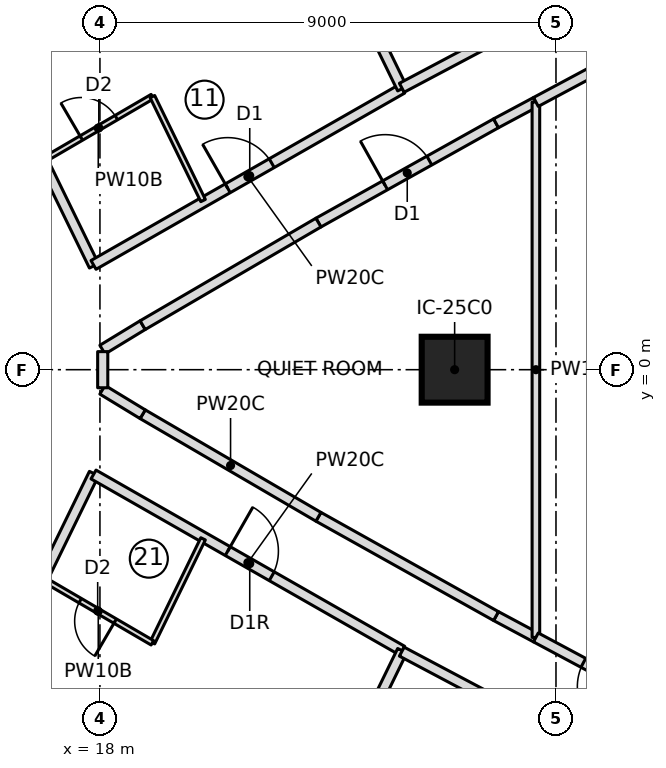
"""IFC4 building model, lengths in metres.
Left out: names, types, materials, properties, quantities, classifications, styles, units other than length and angle.
Written with IfcOpenShell. Run it as: python <this file> out.ifc"""

import sys

from ifc_helpers import new_model, si_unit, direction, frame, frame_2d, origin, origin_2d, place, context, subcontext, project, spatial, rectangle, extrude, element, fill, save


model = new_model("IFC4")
c1 = context("Model", 3, precision=1e-05, world=origin(), true_north=direction((0.0, 1.0)))
c2 = subcontext(c1, "Body", "Model", "MODEL_VIEW")
j1 = project(units=[si_unit("LENGTHUNIT", "METRE"), si_unit("PLANEANGLEUNIT", "RADIAN")], contexts=[c1])
p1 = place(None, origin())
s1 = spatial("IfcSite", under=j1, at=p1, CompositionType="ELEMENT")
p2 = place(p1, origin())
s2 = spatial("IfcBuilding", under=s1, at=p2, CompositionType="ELEMENT")
p3 = place(p2, frame((0.0, 0.0, 71.55)))
s3 = spatial("IfcBuildingStorey", under=s2, at=p3, CompositionType="ELEMENT", Elevation=71.55)
p4 = place(p3, frame((25.0, 0.0, 0.0), z_axis=(0.0, 0.0, 1.0), x_axis=(1.0, 0.0, 0.0)))
e1 = element("IfcColumn", 1, at=p4, inside=s3, PredefinedType="COLUMN", context=c2, shape_type="SweptSolid", body=[
    extrude(rectangle(XDim=1.3, YDim=1.3, at=origin_2d()), origin(), (0.0, 0.0, 1.0), 3.55),
])
p5 = place(p3, frame((17.882, 2.05, 0.0), z_axis=(0.0, 0.0, 1.0), x_axis=(-0.438213564788, 0.898870887078, 0.0)))
e2 = element("IfcWall", 2, at=p5, inside=s3, PredefinedType="PARTITIONING", context=c2, shape_type="SweptSolid", body=[
    extrude(rectangle(XDim=7.625, YDim=0.2, at=frame_2d((3.813, 0.0))), origin(), (0.0, 0.0, 1.0), 3.15),
])
p6 = place(p3, frame((17.874, 2.068, 0.0), z_axis=(0.0, 0.0, 1.0), x_axis=(0.868427275315, 0.495816566373, 0.0)))
e3 = element("IfcWall", 3, at=p6, inside=s3, PredefinedType="PARTITIONING", context=c2, shape_type="SweptSolid", body=[
    extrude(rectangle(XDim=7.015, YDim=0.2, at=frame_2d((3.507, 0.0))), origin(), (0.0, 0.0, 1.0), 3.15),
])
p7 = place(p6, frame((3.05, 0.0, 0.0)))
e4 = element("IfcOpeningElement", 4, at=p7, cuts=e3, PredefinedType="OPENING", context=c2, shape_type="SweptSolid", body=[
    extrude(rectangle(XDim=1.0, YDim=2.1, at=frame_2d((0.5, 1.05))), frame((0.0, 0.11, 0.0), z_axis=(0.0, -1.0, 0.0), x_axis=(1.0, 0.0, 0.0)), (0.0, 0.0, 1.0), 0.22),
])
p8 = place(p3, frame((16.898, 4.144, 0.0), z_axis=(0.0, 0.0, 1.0), x_axis=(0.863707305865, 0.503993739837, 0.0)))
e5 = element("IfcWall", 5, at=p8, inside=s3, PredefinedType="PARTITIONING", context=c2, shape_type="SweptSolid", body=[
    extrude(rectangle(XDim=2.474, YDim=0.1, at=frame_2d((1.237, 0.0))), origin(), (0.0, 0.0, 1.0), 3.15),
])
p9 = place(p8, frame((0.85, 0.0, 0.0)))
e6 = element("IfcOpeningElement", 6, at=p9, cuts=e5, PredefinedType="OPENING", context=c2, shape_type="SweptSolid", body=[
    extrude(rectangle(XDim=0.8, YDim=2.1, at=frame_2d((0.4, 1.05))), frame((0.0, 0.06, 0.0), z_axis=(0.0, -1.0, 0.0), x_axis=(1.0, 0.0, 0.0)), (0.0, 0.0, 1.0), 0.12),
])
p10 = place(p3, frame((19.035, 5.39, 0.0), z_axis=(0.0, 0.0, 1.0), x_axis=(0.438122322582, -0.898915363344, 0.0)))
e7 = element("IfcWall", 7, at=p10, inside=s3, PredefinedType="PARTITIONING", context=c2, shape_type="SweptSolid", body=[
    extrude(rectangle(XDim=2.283, YDim=0.1, at=frame_2d((1.142, 0.0))), origin(), (0.0, 0.0, 1.0), 3.15),
])
p11 = place(p3, frame((23.965, 5.546, 0.0), z_axis=(0.0, 0.0, 1.0), x_axis=(-0.438184754816, 0.898884931816, 0.0)))
e8 = element("IfcWall", 8, at=p11, inside=s3, PredefinedType="PARTITIONING", context=c2, shape_type="SweptSolid", body=[
    extrude(rectangle(XDim=7.612, YDim=0.2, at=frame_2d((3.806, 0.0))), origin(), (0.0, 0.0, 1.0), 3.15),
])
p12 = place(p3, frame((23.957, 5.564, 0.0), z_axis=(0.0, 0.0, 1.0), x_axis=(0.883455325405, 0.468515408513, 0.0)))
e9 = element("IfcWall", 9, at=p12, inside=s3, PredefinedType="PARTITIONING", context=c2, shape_type="SweptSolid", body=[
    extrude(rectangle(XDim=7.004, YDim=0.2, at=frame_2d((3.502, 0.0))), origin(), (0.0, 0.0, 1.0), 3.15),
])
p13 = place(p12, frame((3.7, 0.0, 0.0)))
e10 = element("IfcOpeningElement", 10, at=p13, cuts=e9, PredefinedType="OPENING", context=c2, shape_type="SweptSolid", body=[
    extrude(rectangle(XDim=1.0, YDim=2.1, at=frame_2d((0.5, 1.05))), frame((0.0, 0.11, 0.0), z_axis=(0.0, -1.0, 0.0), x_axis=(1.0, 0.0, 0.0)), (0.0, 0.0, 1.0), 0.22),
])
p14 = place(p3, frame((14.541, -8.904, 0.0), z_axis=(0.0, 0.0, 1.0), x_axis=(0.438213564788, 0.898870887078, 0.0)))
e11 = element("IfcWall", 11, at=p14, inside=s3, PredefinedType="PARTITIONING", context=c2, shape_type="SweptSolid", body=[
    extrude(rectangle(XDim=7.625, YDim=0.2, at=frame_2d((3.813, 0.0))), origin(), (0.0, 0.0, 1.0), 3.15),
])
p15 = place(p3, frame((17.874, -2.068, 0.0), z_axis=(0.0, 0.0, 1.0), x_axis=(0.868427275315, -0.495816566373, 0.0)))
e12 = element("IfcWall", 12, at=p15, inside=s3, PredefinedType="PARTITIONING", context=c2, shape_type="SweptSolid", body=[
    extrude(rectangle(XDim=7.015, YDim=0.2, at=frame_2d((3.507, 0.0))), origin(), (0.0, 0.0, 1.0), 3.15),
])
p16 = place(p15, frame((3.05, 0.0, 0.0)))
e13 = element("IfcOpeningElement", 13, at=p16, cuts=e12, PredefinedType="OPENING", context=c2, shape_type="SweptSolid", body=[
    extrude(rectangle(XDim=1.0, YDim=2.1, at=frame_2d((0.5, 1.05))), frame((0.0, 0.11, 0.0), z_axis=(0.0, -1.0, 0.0), x_axis=(1.0, 0.0, 0.0)), (0.0, 0.0, 1.0), 0.22),
])
p17 = place(p3, frame((20.035, -3.338, 0.0), z_axis=(0.0, 0.0, 1.0), x_axis=(-0.438122322582, -0.898915363344, 0.0)))
e14 = element("IfcWall", 14, at=p17, inside=s3, PredefinedType="PARTITIONING", context=c2, shape_type="SweptSolid", body=[
    extrude(rectangle(XDim=2.283, YDim=0.1, at=frame_2d((1.142, 0.0))), origin(), (0.0, 0.0, 1.0), 3.15),
])
p18 = place(p3, frame((19.035, -5.39, 0.0), z_axis=(0.0, 0.0, 1.0), x_axis=(-0.863707305865, 0.503993739837, 0.0)))
e15 = element("IfcWall", 15, at=p18, inside=s3, PredefinedType="PARTITIONING", context=c2, shape_type="SweptSolid", body=[
    extrude(rectangle(XDim=2.474, YDim=0.1, at=frame_2d((1.237, 0.0))), origin(), (0.0, 0.0, 1.0), 3.15),
])
p19 = place(p18, frame((0.85, 0.0, 0.0)))
e16 = element("IfcOpeningElement", 16, at=p19, cuts=e15, PredefinedType="OPENING", context=c2, shape_type="SweptSolid", body=[
    extrude(rectangle(XDim=0.8, YDim=2.1, at=frame_2d((0.4, 1.05))), frame((0.0, 0.06, 0.0), z_axis=(0.0, -1.0, 0.0), x_axis=(1.0, 0.0, 0.0)), (0.0, 0.0, 1.0), 0.12),
])
p20 = place(p3, frame((20.63, -12.388, 0.0), z_axis=(0.0, 0.0, 1.0), x_axis=(0.438184754816, 0.898884931816, 0.0)))
e17 = element("IfcWall", 17, at=p20, inside=s3, PredefinedType="PARTITIONING", context=c2, shape_type="SweptSolid", body=[
    extrude(rectangle(XDim=7.612, YDim=0.2, at=frame_2d((3.806, 0.0))), origin(), (0.0, 0.0, 1.0), 3.15),
])
p21 = place(p3, frame((23.957, -5.564, 0.0), z_axis=(0.0, 0.0, 1.0), x_axis=(0.883455325405, -0.468515408513, 0.0)))
e18 = element("IfcWall", 18, at=p21, inside=s3, PredefinedType="PARTITIONING", context=c2, shape_type="SweptSolid", body=[
    extrude(rectangle(XDim=7.004, YDim=0.2, at=frame_2d((3.502, 0.0))), origin(), (0.0, 0.0, 1.0), 3.15),
])
p22 = place(p21, frame((3.7, 0.0, 0.0)))
e19 = element("IfcOpeningElement", 19, at=p22, cuts=e18, PredefinedType="OPENING", context=c2, shape_type="SweptSolid", body=[
    extrude(rectangle(XDim=1.0, YDim=2.1, at=frame_2d((0.5, 1.05))), frame((0.0, 0.11, 0.0), z_axis=(0.0, -1.0, 0.0), x_axis=(1.0, 0.0, 0.0)), (0.0, 0.0, 1.0), 0.22),
])
p23 = place(p3, frame((22.312, 2.903, 0.0), z_axis=(0.0, 0.0, 1.0), x_axis=(0.872800289292, 0.488077509225, 0.0)))
e20 = element("IfcWall", 20, at=p23, inside=s3, PredefinedType="PARTITIONING", context=c2, shape_type="SweptSolid", body=[
    extrude(rectangle(XDim=4.016, YDim=0.2, at=frame_2d((2.008, 0.0))), origin(), (0.0, 0.0, 1.0), 3.15),
])
p24 = place(p23, frame((1.508, 0.0, 0.0)))
e21 = element("IfcOpeningElement", 21, at=p24, cuts=e20, PredefinedType="OPENING", context=c2, shape_type="SweptSolid", body=[
    extrude(rectangle(XDim=1.0, YDim=2.1, at=frame_2d((0.5, 1.05))), frame((0.0, 0.11, 0.0), z_axis=(0.0, -1.0, 0.0), x_axis=(1.0, 0.0, 0.0)), (0.0, 0.0, 1.0), 0.22),
])
p25 = place(p3, frame((26.604, -5.284, 0.0), z_axis=(0.0, 0.0, 1.0), x_axis=(-0.881715816073, 0.471780902207, 0.0)))
e22 = element("IfcWall", 22, at=p25, inside=s3, PredefinedType="PARTITIONING", context=c2, shape_type="SweptSolid", body=[
    extrude(rectangle(XDim=0.892, YDim=0.2, at=frame_2d((0.446, 0.0))), origin(), (0.0, 0.0, 1.0), 3.15),
])
p26 = place(p3, frame((25.817, -4.863, 0.0), z_axis=(0.0, 0.0, 1.0), x_axis=(-0.872800289292, 0.488077509225, 0.0)))
e23 = element("IfcWall", 23, at=p26, inside=s3, PredefinedType="PARTITIONING", context=c2, shape_type="SweptSolid", body=[
    extrude(rectangle(XDim=4.016, YDim=0.2, at=frame_2d((2.008, 0.0))), origin(), (0.0, 0.0, 1.0), 3.15),
])
p27 = place(p3, frame((22.312, -2.903, 0.0), z_axis=(0.0, 0.0, 1.0), x_axis=(-0.863710538269, 0.503988200341, 0.0)))
e24 = element("IfcWall", 24, at=p27, inside=s3, PredefinedType="PARTITIONING", context=c2, shape_type="SweptSolid", body=[
    extrude(rectangle(XDim=4.016, YDim=0.2, at=frame_2d((2.008, 0.0))), origin(), (0.0, 0.0, 1.0), 3.15),
])
for number, where, z_axis, x_axis in (
    (25, (18.844, -0.879, 0.0), (0.0, 0.0, 1.0), (-0.854, 0.52, 0.0)),
    (26, (18.05, 0.396, 0.0), (0.0, 0.0, 1.0), (0.854, 0.52, 0.0)),
):
    element("IfcWall", number, at=place(p3, frame(where, z_axis=z_axis, x_axis=x_axis)), inside=s3, PredefinedType="PARTITIONING", context=c2, shape_type="SweptSolid", body=[
        extrude(rectangle(XDim=0.929, YDim=0.2, at=frame_2d((0.464, 0.0))), origin(), (0.0, 0.0, 1.0), 3.15),
    ])
p28 = place(p3, frame((18.844, 0.879, 0.0), z_axis=(0.0, 0.0, 1.0), x_axis=(0.863710538269, 0.503988200341, 0.0)))
e27 = element("IfcWall", 27, at=p28, inside=s3, PredefinedType="PARTITIONING", context=c2, shape_type="SweptSolid", body=[
    extrude(rectangle(XDim=4.016, YDim=0.2, at=frame_2d((2.008, 0.0))), origin(), (0.0, 0.0, 1.0), 3.15),
])
p29 = place(p3, frame((25.817, 4.863, 0.0), z_axis=(0.0, 0.0, 1.0), x_axis=(0.881715816073, 0.471780902207, 0.0)))
e28 = element("IfcWall", 28, at=p29, inside=s3, PredefinedType="PARTITIONING", context=c2, shape_type="SweptSolid", body=[
    extrude(rectangle(XDim=0.892, YDim=0.2, at=frame_2d((0.446, 0.0))), origin(), (0.0, 0.0, 1.0), 3.15),
])
p30 = place(p3, frame((26.604, -5.284, 0.0), z_axis=(0.0, 0.0, 1.0), x_axis=(0.0, 1.0, 0.0)))
e29 = element("IfcWall", 29, at=p30, inside=s3, PredefinedType="PARTITIONING", context=c2, shape_type="SweptSolid", body=[
    extrude(rectangle(XDim=10.568, YDim=0.15, at=frame_2d((5.284, 0.0))), origin(), (0.0, 0.0, 1.0), 3.15),
])
p31 = place(p3, frame((29.357, -6.758, 0.0), z_axis=(0.0, 0.0, 1.0), x_axis=(-0.881637943627, 0.471926409895, 0.0)))
e30 = element("IfcWall", 30, at=p31, inside=s3, PredefinedType="PARTITIONING", context=c2, shape_type="SweptSolid", body=[
    extrude(rectangle(XDim=3.124, YDim=0.2, at=frame_2d((1.562, 0.0))), origin(), (0.0, 0.0, 1.0), 3.15),
])
p32 = place(p31, frame((1.062, 0.0, 0.0)))
e31 = element("IfcOpeningElement", 31, at=p32, cuts=e30, PredefinedType="OPENING", context=c2, shape_type="SweptSolid", body=[
    extrude(rectangle(XDim=1.0, YDim=2.1, at=frame_2d((0.5, 1.05))), frame((0.0, 0.11, 0.0), z_axis=(0.0, -1.0, 0.0), x_axis=(1.0, 0.0, 0.0)), (0.0, 0.0, 1.0), 0.22),
])
p33 = place(p3, frame((26.604, 5.284, 0.0), z_axis=(0.0, 0.0, 1.0), x_axis=(0.881637943627, 0.471926409895, 0.0)))
e32 = element("IfcWall", 32, at=p33, inside=s3, PredefinedType="PARTITIONING", context=c2, shape_type="SweptSolid", body=[
    extrude(rectangle(XDim=3.124, YDim=0.2, at=frame_2d((1.562, 0.0))), origin(), (0.0, 0.0, 1.0), 3.15),
])
p34 = place(p3, frame((18.055, -0.357, 0.0), z_axis=(0.0, 0.0, 1.0), x_axis=(0.0, 1.0, 0.0)))
e33 = element("IfcWall", 33, at=p34, inside=s3, PredefinedType="PARTITIONING", context=c2, shape_type="SweptSolid", body=[
    extrude(rectangle(XDim=0.713, YDim=0.2, at=frame_2d((0.357, 0.0))), origin(), (0.0, 0.0, 1.0), 3.15),
])
p35 = place(p9, origin())
e34 = element("IfcDoor", 34, at=p35, inside=s3, OperationType="SINGLE_SWING_LEFT", PredefinedType="DOOR", context=c2, shape_type="SweptSolid", body=[
    extrude(rectangle(XDim=0.8, YDim=2.1, at=frame_2d((0.4, 1.05))), frame((0.0, 0.025, 0.0), z_axis=(0.0, -1.0, 0.0), x_axis=(1.0, 0.0, 0.0)), (0.0, 0.0, 1.0), 0.05),
])
fill(e6, e34)
p36 = place(p7, origin())
e35 = element("IfcDoor", 35, at=p36, inside=s3, OperationType="SINGLE_SWING_LEFT", PredefinedType="DOOR", context=c2, shape_type="SweptSolid", body=[
    extrude(rectangle(XDim=1.0, YDim=2.1, at=frame_2d((0.5, 1.05))), frame((0.0, 0.025, 0.0), z_axis=(0.0, -1.0, 0.0), x_axis=(1.0, 0.0, 0.0)), (0.0, 0.0, 1.0), 0.05),
])
fill(e4, e35)
p37 = place(p19, origin())
e36 = element("IfcDoor", 36, at=p37, inside=s3, OperationType="SINGLE_SWING_LEFT", PredefinedType="DOOR", context=c2, shape_type="SweptSolid", body=[
    extrude(rectangle(XDim=0.8, YDim=2.1, at=frame_2d((0.4, 1.05))), frame((0.0, 0.025, 0.0), z_axis=(0.0, -1.0, 0.0), x_axis=(1.0, 0.0, 0.0)), (0.0, 0.0, 1.0), 0.05),
])
fill(e16, e36)
p38 = place(p16, origin())
e37 = element("IfcDoor", 37, at=p38, inside=s3, OperationType="SINGLE_SWING_RIGHT", PredefinedType="DOOR", context=c2, shape_type="SweptSolid", body=[
    extrude(rectangle(XDim=1.0, YDim=2.1, at=frame_2d((0.5, 1.05))), frame((0.0, 0.025, 0.0), z_axis=(0.0, -1.0, 0.0), x_axis=(1.0, 0.0, 0.0)), (0.0, 0.0, 1.0), 0.05),
])
fill(e13, e37)
p39 = place(p24, origin())
e38 = element("IfcDoor", 38, at=p39, inside=s3, OperationType="SINGLE_SWING_LEFT", PredefinedType="DOOR", context=c2, shape_type="SweptSolid", body=[
    extrude(rectangle(XDim=1.0, YDim=2.1, at=frame_2d((0.5, 1.05))), frame((0.0, 0.025, 0.0), z_axis=(0.0, -1.0, 0.0), x_axis=(1.0, 0.0, 0.0)), (0.0, 0.0, 1.0), 0.05),
])
fill(e21, e38)
p40 = place(p32, origin())
e39 = element("IfcDoor", 39, at=p40, inside=s3, OperationType="SINGLE_SWING_RIGHT", PredefinedType="DOOR", context=c2, shape_type="SweptSolid", body=[
    extrude(rectangle(XDim=1.0, YDim=2.1, at=frame_2d((0.5, 1.05))), frame((0.0, 0.025, 0.0), z_axis=(0.0, -1.0, 0.0), x_axis=(1.0, 0.0, 0.0)), (0.0, 0.0, 1.0), 0.05),
])
fill(e31, e39)
save(model, sys.argv[1])
